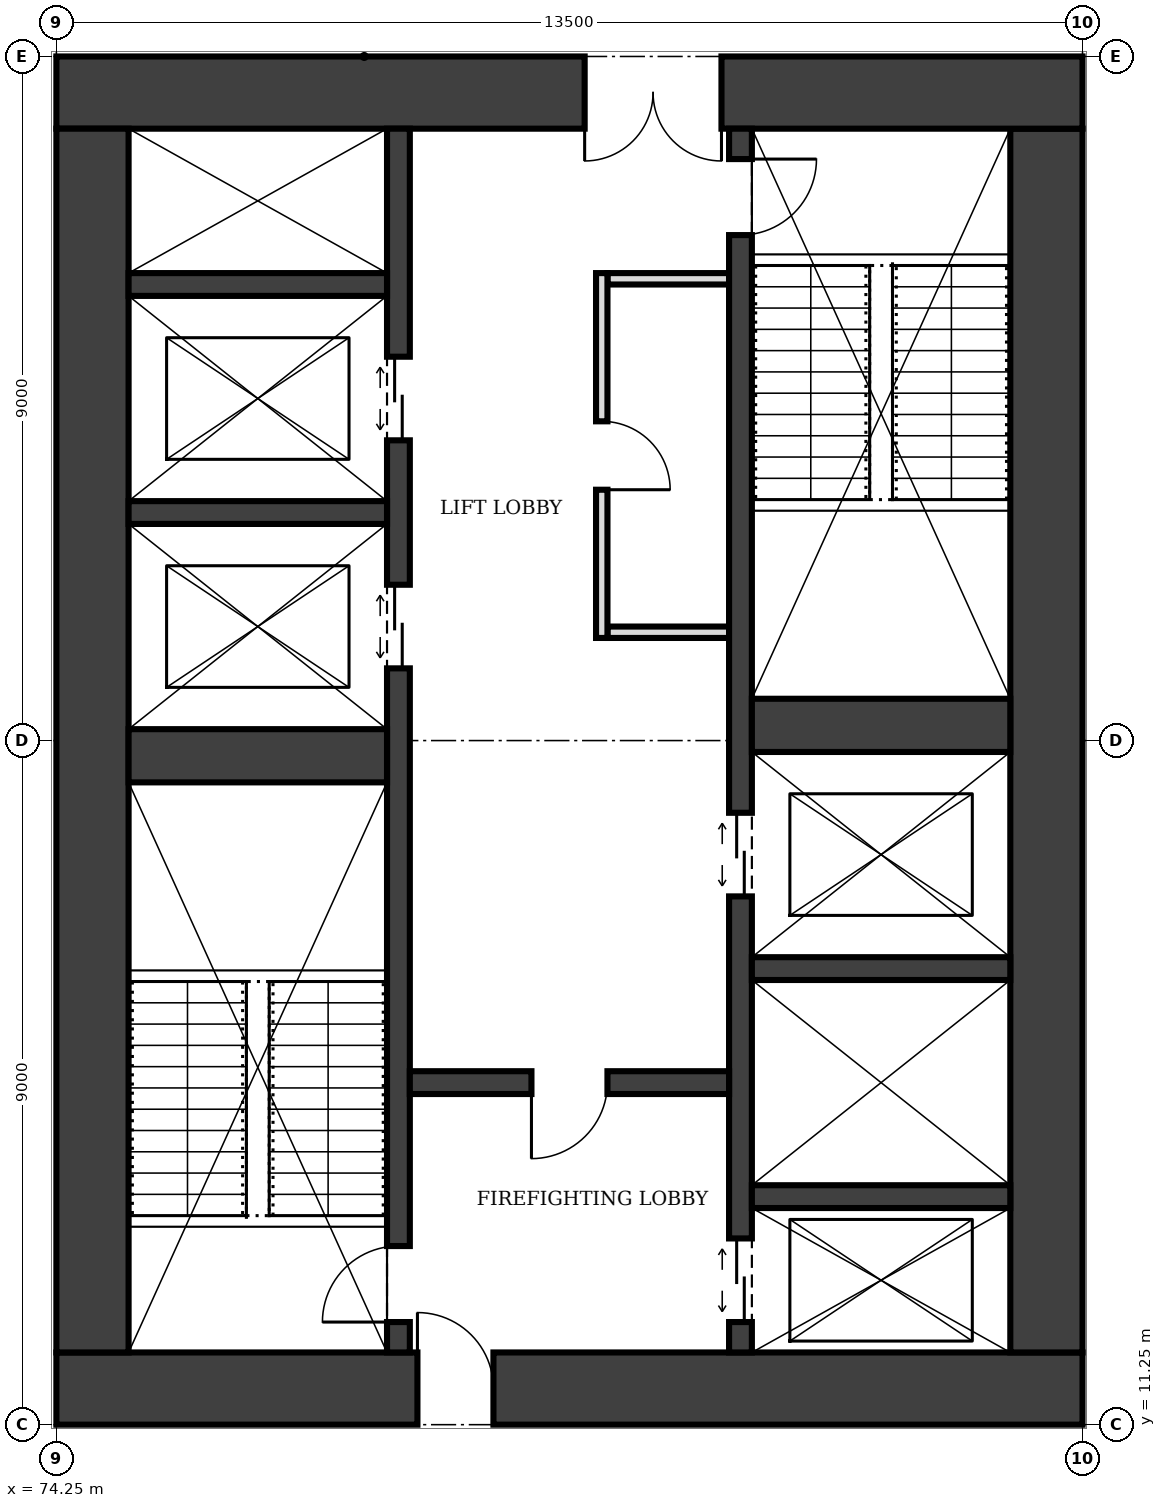
"""IFC4 building model, lengths in metres.
Left out: names, types, materials, properties, quantities, classifications, styles, units other than length and angle.
Written with IfcOpenShell. Run it as: python <this file> out.ifc"""

import sys

from ifc_helpers import new_model, si_unit, direction, frame, frame_2d, origin, place, context, subcontext, project, spatial, rectangle, extrude, element, fill, save


model = new_model("IFC4")
c1 = context("Model", 3, precision=1e-05, world=origin(), true_north=direction((0.0, 1.0)))
c2 = subcontext(c1, "Body", "Model", "MODEL_VIEW")
j1 = project(units=[si_unit("LENGTHUNIT", "METRE"), si_unit("PLANEANGLEUNIT", "RADIAN")], contexts=[c1])
p1 = place(None, origin())
s1 = spatial("IfcSite", under=j1, at=p1, CompositionType="ELEMENT")
p2 = place(p1, origin())
s2 = spatial("IfcBuilding", under=s1, at=p2, CompositionType="ELEMENT")
p3 = place(p2, frame((0.0, 0.0, 37.0)))
s3 = spatial("IfcBuildingStorey", under=s2, at=p3, CompositionType="ELEMENT", Elevation=37.0)
p4 = place(p3, frame((74.25, 11.725, 0.0), z_axis=(0.0, 0.0, 1.0), x_axis=(1.0, 0.0, 0.0)))
e1 = element("IfcWall", 1, at=p4, inside=s3, PredefinedType="SHEAR", context=c2, shape_type="SweptSolid", body=[
    extrude(rectangle(XDim=13.5, YDim=0.95, at=frame_2d((6.75, 0.0))), origin(), (0.0, 0.0, 1.0), 4.0),
])
p5 = place(p4, frame((4.75, 0.0, 0.0)))
e2 = element("IfcOpeningElement", 2, at=p5, cuts=e1, PredefinedType="OPENING", context=c2, shape_type="SweptSolid", body=[
    extrude(rectangle(XDim=1.0, YDim=2.1, at=frame_2d((0.5, 1.05))), frame((0.0, 0.485, 0.0), z_axis=(0.0, -1.0, 0.0), x_axis=(1.0, 0.0, 0.0)), (0.0, 0.0, 1.0), 0.97),
])
p6 = place(p3, frame((87.275, 12.2, 0.0), z_axis=(0.0, 0.0, 1.0), x_axis=(0.0, 1.0, 0.0)))
e3 = element("IfcWall", 3, at=p6, inside=s3, PredefinedType="SHEAR", context=c2, shape_type="SweptSolid", body=[
    extrude(rectangle(XDim=16.1, YDim=0.95, at=frame_2d((8.05, 0.0))), origin(), (0.0, 0.0, 1.0), 4.0),
])
p7 = place(p3, frame((87.75, 28.775, 0.0), z_axis=(0.0, 0.0, 1.0), x_axis=(-1.0, 0.0, 0.0)))
e4 = element("IfcWall", 4, at=p7, inside=s3, PredefinedType="SHEAR", context=c2, shape_type="SweptSolid", body=[
    extrude(rectangle(XDim=13.5, YDim=0.95, at=frame_2d((6.75, 0.0))), origin(), (0.0, 0.0, 1.0), 4.0),
])
p8 = place(p7, frame((4.75, 0.0, 0.0)))
e5 = element("IfcOpeningElement", 5, at=p8, cuts=e4, PredefinedType="OPENING", context=c2, shape_type="SweptSolid", body=[
    extrude(rectangle(XDim=1.8, YDim=2.1, at=frame_2d((0.9, 1.05))), frame((0.0, 0.485, 0.0), z_axis=(0.0, -1.0, 0.0), x_axis=(1.0, 0.0, 0.0)), (0.0, 0.0, 1.0), 0.97),
])
p9 = place(p3, frame((74.725, 28.3, 0.0), z_axis=(0.0, 0.0, 1.0), x_axis=(0.0, -1.0, 0.0)))
e6 = element("IfcWall", 6, at=p9, inside=s3, PredefinedType="SHEAR", context=c2, shape_type="SweptSolid", body=[
    extrude(rectangle(XDim=16.1, YDim=0.95, at=frame_2d((8.05, 0.0))), origin(), (0.0, 0.0, 1.0), 4.0),
])
p10 = place(p3, frame((78.75, 12.2, 0.0), z_axis=(0.0, 0.0, 1.0), x_axis=(0.0, 1.0, 0.0)))
e7 = element("IfcWall", 7, at=p10, inside=s3, PredefinedType="SHEAR", context=c2, shape_type="SweptSolid", body=[
    extrude(rectangle(XDim=16.1, YDim=0.3, at=frame_2d((8.05, 0.0))), origin(), (0.0, 0.0, 1.0), 4.0),
])
p11 = place(p10, frame((0.4, 0.0, 0.0)))
e8 = element("IfcOpeningElement", 8, at=p11, cuts=e7, PredefinedType="OPENING", context=c2, shape_type="SweptSolid", body=[
    extrude(rectangle(XDim=1.0, YDim=2.1, at=frame_2d((0.5, 1.05))), frame((0.0, 0.16, 0.0), z_axis=(0.0, -1.0, 0.0), x_axis=(1.0, 0.0, 0.0)), (0.0, 0.0, 1.0), 0.32),
])
p12 = place(p10, frame((9.0, 0.0, 0.0)))
e9 = element("IfcOpeningElement", 9, at=p12, cuts=e7, PredefinedType="OPENING", context=c2, shape_type="SweptSolid", body=[
    extrude(rectangle(XDim=1.1, YDim=2.1, at=frame_2d((0.55, 1.05))), frame((0.0, 0.16, 0.0), z_axis=(0.0, -1.0, 0.0), x_axis=(1.0, 0.0, 0.0)), (0.0, 0.0, 1.0), 0.32),
])
p13 = place(p10, frame((12.0, 0.0, 0.0)))
e10 = element("IfcOpeningElement", 10, at=p13, cuts=e7, PredefinedType="OPENING", context=c2, shape_type="SweptSolid", body=[
    extrude(rectangle(XDim=1.1, YDim=2.1, at=frame_2d((0.55, 1.05))), frame((0.0, 0.16, 0.0), z_axis=(0.0, -1.0, 0.0), x_axis=(1.0, 0.0, 0.0)), (0.0, 0.0, 1.0), 0.32),
])
p14 = place(p3, frame((83.25, 12.2, 0.0), z_axis=(0.0, 0.0, 1.0), x_axis=(0.0, 1.0, 0.0)))
e11 = element("IfcWall", 11, at=p14, inside=s3, PredefinedType="SHEAR", context=c2, shape_type="SweptSolid", body=[
    extrude(rectangle(XDim=16.1, YDim=0.3, at=frame_2d((8.05, 0.0))), origin(), (0.0, 0.0, 1.0), 4.0),
])
p15 = place(p14, frame((14.7, 0.0, 0.0)))
e12 = element("IfcOpeningElement", 12, at=p15, cuts=e11, PredefinedType="OPENING", context=c2, shape_type="SweptSolid", body=[
    extrude(rectangle(XDim=1.0, YDim=2.1, at=frame_2d((0.5, 1.05))), frame((0.0, 0.16, 0.0), z_axis=(0.0, -1.0, 0.0), x_axis=(1.0, 0.0, 0.0)), (0.0, 0.0, 1.0), 0.32),
])
p16 = place(p14, frame((0.4, 0.0, 0.0)))
e13 = element("IfcOpeningElement", 13, at=p16, cuts=e11, PredefinedType="OPENING", context=c2, shape_type="SweptSolid", body=[
    extrude(rectangle(XDim=1.1, YDim=2.1, at=frame_2d((0.55, 1.05))), frame((0.0, 0.16, 0.0), z_axis=(0.0, -1.0, 0.0), x_axis=(1.0, 0.0, 0.0)), (0.0, 0.0, 1.0), 0.32),
])
p17 = place(p14, frame((6.0, 0.0, 0.0)))
e14 = element("IfcOpeningElement", 14, at=p17, cuts=e11, PredefinedType="OPENING", context=c2, shape_type="SweptSolid", body=[
    extrude(rectangle(XDim=1.1, YDim=2.1, at=frame_2d((0.55, 1.05))), frame((0.0, 0.16, 0.0), z_axis=(0.0, -1.0, 0.0), x_axis=(1.0, 0.0, 0.0)), (0.0, 0.0, 1.0), 0.32),
])
p18 = place(p3, frame((75.2, 20.05, 0.0), z_axis=(0.0, 0.0, 1.0), x_axis=(1.0, 0.0, 0.0)))
e15 = element("IfcWall", 15, at=p18, inside=s3, PredefinedType="SHEAR", context=c2, shape_type="SweptSolid", body=[
    extrude(rectangle(XDim=3.4, YDim=0.7, at=frame_2d((1.7, 0.0))), origin(), (0.0, 0.0, 1.0), 4.0),
])
p19 = place(p3, frame((78.9, 15.75, 0.0), z_axis=(0.0, 0.0, 1.0), x_axis=(1.0, 0.0, 0.0)))
e16 = element("IfcWall", 16, at=p19, inside=s3, PredefinedType="SHEAR", context=c2, shape_type="SweptSolid", body=[
    extrude(rectangle(XDim=4.2, YDim=0.3, at=frame_2d((2.1, 0.0))), origin(), (0.0, 0.0, 1.0), 4.0),
])
p20 = place(p19, frame((1.6, 0.0, 0.0)))
e17 = element("IfcOpeningElement", 17, at=p20, cuts=e16, PredefinedType="OPENING", context=c2, shape_type="SweptSolid", body=[
    extrude(rectangle(XDim=1.0, YDim=2.1, at=frame_2d((0.5, 1.05))), frame((0.0, 0.16, 0.0), z_axis=(0.0, -1.0, 0.0), x_axis=(1.0, 0.0, 0.0)), (0.0, 0.0, 1.0), 0.32),
])
for number, where, z_axis, x_axis in (
    (18, (83.4, 14.25, 0.0), (0.0, 0.0, 1.0), (1.0, 0.0, 0.0)),
    (19, (83.4, 17.25, 0.0), (0.0, 0.0, 1.0), (1.0, 0.0, 0.0)),
):
    element("IfcWall", number, at=place(p3, frame(where, z_axis=z_axis, x_axis=x_axis)), inside=s3, PredefinedType="SHEAR", context=c2, shape_type="SweptSolid", body=[
        extrude(rectangle(XDim=3.4, YDim=0.3, at=frame_2d((1.7, 0.0))), origin(), (0.0, 0.0, 1.0), 4.0),
    ])
p21 = place(p3, frame((83.4, 20.45, 0.0), z_axis=(0.0, 0.0, 1.0), x_axis=(1.0, 0.0, 0.0)))
e20 = element("IfcWall", 20, at=p21, inside=s3, PredefinedType="SHEAR", context=c2, shape_type="SweptSolid", body=[
    extrude(rectangle(XDim=3.4, YDim=0.7, at=frame_2d((1.7, 0.0))), origin(), (0.0, 0.0, 1.0), 4.0),
])
for number, where, z_axis, x_axis in (
    (21, (75.2, 23.25, 0.0), (0.0, 0.0, 1.0), (1.0, 0.0, 0.0)),
    (22, (75.2, 26.25, 0.0), (0.0, 0.0, 1.0), (1.0, 0.0, 0.0)),
):
    element("IfcWall", number, at=place(p3, frame(where, z_axis=z_axis, x_axis=x_axis)), inside=s3, PredefinedType="SHEAR", context=c2, shape_type="SweptSolid", body=[
        extrude(rectangle(XDim=3.4, YDim=0.3, at=frame_2d((1.7, 0.0))), origin(), (0.0, 0.0, 1.0), 4.0),
    ])
p22 = place(p3, frame((81.425, 21.6, 0.0), z_axis=(0.0, 0.0, 1.0), x_axis=(0.0, 1.0, 0.0)))
e23 = element("IfcWall", 23, at=p22, inside=s3, PredefinedType="PARTITIONING", context=c2, shape_type="SweptSolid", body=[
    extrude(rectangle(XDim=4.8, YDim=0.15, at=frame_2d((2.4, 0.0))), origin(), (0.0, 0.0, 1.0), 3.75),
])
p23 = place(p22, frame((1.95, 0.0, 0.0)))
e24 = element("IfcOpeningElement", 24, at=p23, cuts=e23, PredefinedType="OPENING", context=c2, shape_type="SweptSolid", body=[
    extrude(rectangle(XDim=0.9, YDim=2.1, at=frame_2d((0.45, 1.05))), frame((0.0, 0.085, 0.0), z_axis=(0.0, -1.0, 0.0), x_axis=(1.0, 0.0, 0.0)), (0.0, 0.0, 1.0), 0.17),
])
for number, where, z_axis, x_axis in (
    (25, (81.5, 21.675, 0.0), (0.0, 0.0, 1.0), (1.0, 0.0, 0.0)),
    (26, (81.5, 26.325, 0.0), (0.0, 0.0, 1.0), (1.0, 0.0, 0.0)),
):
    element("IfcWall", number, at=place(p3, frame(where, z_axis=z_axis, x_axis=x_axis)), inside=s3, PredefinedType="PARTITIONING", context=c2, shape_type="SweptSolid", body=[
        extrude(rectangle(XDim=1.6, YDim=0.15, at=frame_2d((0.8, 0.0))), origin(), (0.0, 0.0, 1.0), 3.75),
    ])
p24 = place(p5, origin())
e27 = element("IfcDoor", 27, at=p24, inside=s3, OperationType="SINGLE_SWING_LEFT", PredefinedType="DOOR", context=c2, shape_type="SweptSolid", body=[
    extrude(rectangle(XDim=1.0, YDim=2.1, at=frame_2d((0.5, 1.05))), frame((0.0, 0.025, 0.0), z_axis=(0.0, -1.0, 0.0), x_axis=(1.0, 0.0, 0.0)), (0.0, 0.0, 1.0), 0.05),
])
fill(e2, e27)
p25 = place(p8, origin())
e28 = element("IfcDoor", 28, at=p25, inside=s3, OperationType="DOUBLE_DOOR_SINGLE_SWING", PredefinedType="DOOR", context=c2, shape_type="SweptSolid", body=[
    extrude(rectangle(XDim=1.8, YDim=2.1, at=frame_2d((0.9, 1.05))), frame((0.0, 0.025, 0.0), z_axis=(0.0, -1.0, 0.0), x_axis=(1.0, 0.0, 0.0)), (0.0, 0.0, 1.0), 0.05),
])
fill(e5, e28)
p26 = place(p20, frame((1.0, 0.0, 0.0), z_axis=(0.0, 0.0, 1.0), x_axis=(-1.0, 0.0, 0.0)))
e29 = element("IfcDoor", 29, at=p26, inside=s3, OperationType="SINGLE_SWING_RIGHT", PredefinedType="DOOR", context=c2, shape_type="SweptSolid", body=[
    extrude(rectangle(XDim=1.0, YDim=2.1, at=frame_2d((0.5, 1.05))), frame((0.0, 0.025, 0.0), z_axis=(0.0, -1.0, 0.0), x_axis=(1.0, 0.0, 0.0)), (0.0, 0.0, 1.0), 0.05),
])
fill(e17, e29)
p27 = place(p11, origin())
e30 = element("IfcDoor", 30, at=p27, inside=s3, OperationType="SINGLE_SWING_LEFT", PredefinedType="DOOR", context=c2, shape_type="SweptSolid", body=[
    extrude(rectangle(XDim=1.0, YDim=2.1, at=frame_2d((0.5, 1.05))), frame((0.0, 0.025, 0.0), z_axis=(0.0, -1.0, 0.0), x_axis=(1.0, 0.0, 0.0)), (0.0, 0.0, 1.0), 0.05),
])
fill(e8, e30)
p28 = place(p15, frame((1.0, 0.0, 0.0), z_axis=(0.0, 0.0, 1.0), x_axis=(-1.0, 0.0, 0.0)))
e31 = element("IfcDoor", 31, at=p28, inside=s3, OperationType="SINGLE_SWING_LEFT", PredefinedType="DOOR", context=c2, shape_type="SweptSolid", body=[
    extrude(rectangle(XDim=1.0, YDim=2.1, at=frame_2d((0.5, 1.05))), frame((0.0, 0.025, 0.0), z_axis=(0.0, -1.0, 0.0), x_axis=(1.0, 0.0, 0.0)), (0.0, 0.0, 1.0), 0.05),
])
fill(e12, e31)
p29 = place(p16, origin())
e32 = element("IfcDoor", 32, at=p29, inside=s3, OperationType="DOUBLE_DOOR_SLIDING", PredefinedType="DOOR", context=c2, shape_type="SweptSolid", body=[
    extrude(rectangle(XDim=1.1, YDim=2.1, at=frame_2d((0.55, 1.05))), frame((0.0, 0.025, 0.0), z_axis=(0.0, -1.0, 0.0), x_axis=(1.0, 0.0, 0.0)), (0.0, 0.0, 1.0), 0.05),
])
fill(e13, e32)
p30 = place(p12, origin())
e33 = element("IfcDoor", 33, at=p30, inside=s3, OperationType="DOUBLE_DOOR_SLIDING", PredefinedType="DOOR", context=c2, shape_type="SweptSolid", body=[
    extrude(rectangle(XDim=1.1, YDim=2.1, at=frame_2d((0.55, 1.05))), frame((0.0, 0.025, 0.0), z_axis=(0.0, -1.0, 0.0), x_axis=(1.0, 0.0, 0.0)), (0.0, 0.0, 1.0), 0.05),
])
fill(e9, e33)
p31 = place(p13, origin())
e34 = element("IfcDoor", 34, at=p31, inside=s3, OperationType="DOUBLE_DOOR_SLIDING", PredefinedType="DOOR", context=c2, shape_type="SweptSolid", body=[
    extrude(rectangle(XDim=1.1, YDim=2.1, at=frame_2d((0.55, 1.05))), frame((0.0, 0.025, 0.0), z_axis=(0.0, -1.0, 0.0), x_axis=(1.0, 0.0, 0.0)), (0.0, 0.0, 1.0), 0.05),
])
fill(e10, e34)
p32 = place(p17, origin())
e35 = element("IfcDoor", 35, at=p32, inside=s3, OperationType="DOUBLE_DOOR_SLIDING", PredefinedType="DOOR", context=c2, shape_type="SweptSolid", body=[
    extrude(rectangle(XDim=1.1, YDim=2.1, at=frame_2d((0.55, 1.05))), frame((0.0, 0.025, 0.0), z_axis=(0.0, -1.0, 0.0), x_axis=(1.0, 0.0, 0.0)), (0.0, 0.0, 1.0), 0.05),
])
fill(e14, e35)
p33 = place(p23, frame((0.9, 0.0, 0.0), z_axis=(0.0, 0.0, 1.0), x_axis=(-1.0, 0.0, 0.0)))
e36 = element("IfcDoor", 36, at=p33, inside=s3, OperationType="SINGLE_SWING_RIGHT", PredefinedType="DOOR", context=c2, shape_type="SweptSolid", body=[
    extrude(rectangle(XDim=0.9, YDim=2.1, at=frame_2d((0.45, 1.05))), frame((0.0, 0.025, 0.0), z_axis=(0.0, -1.0, 0.0), x_axis=(1.0, 0.0, 0.0)), (0.0, 0.0, 1.0), 0.05),
])
fill(e24, e36)
save(model, sys.argv[1])
